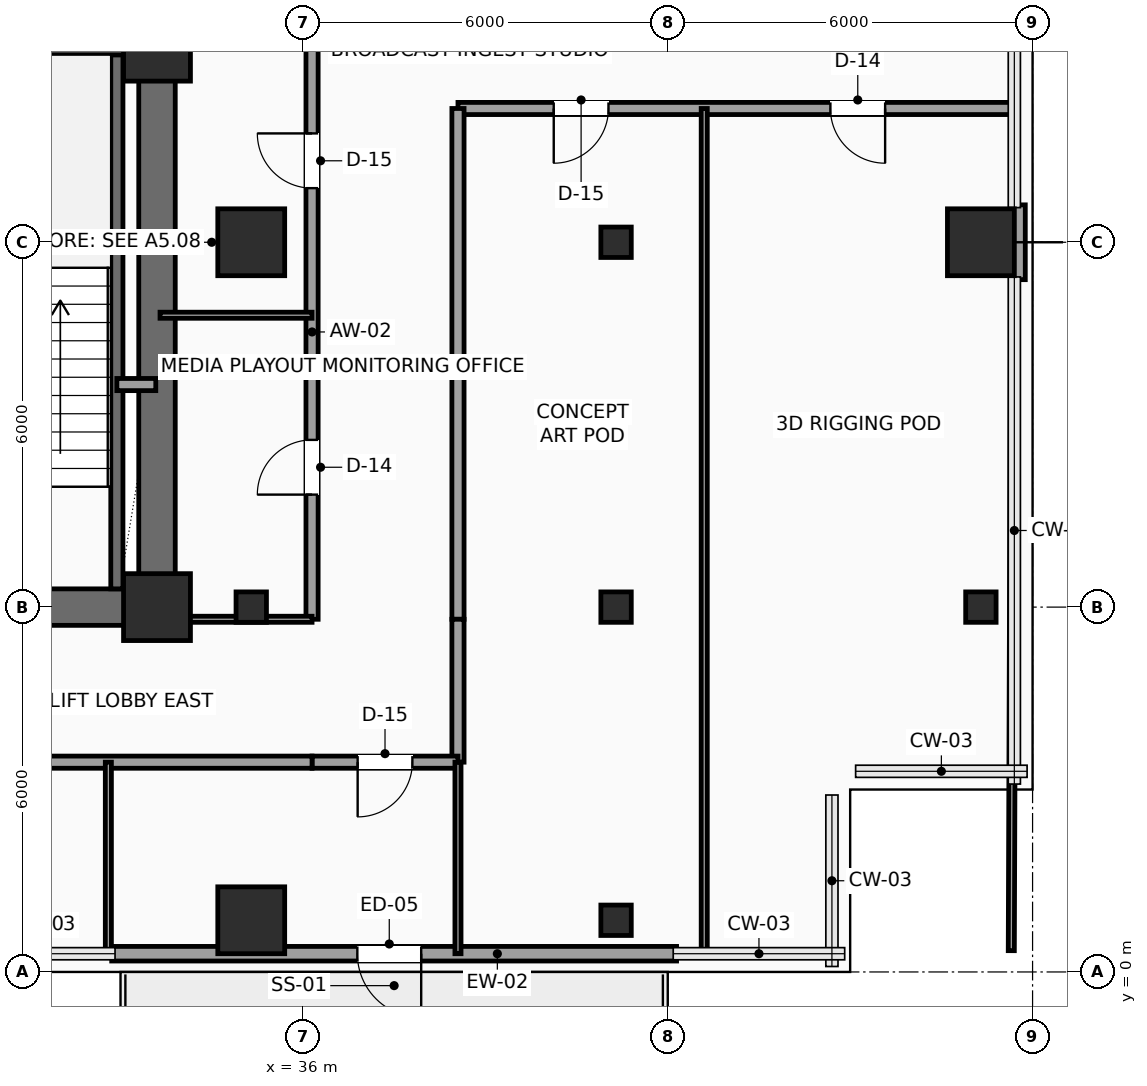
"""IFC4 building model, lengths in metres.
Left out: names, types, materials, properties, quantities, classifications, styles, units other than length and angle.
Written with IfcOpenShell. Run it as: python <this file> out.ifc"""

import sys

from ifc_helpers import new_model, si_unit, direction, frame, frame_2d, origin, origin_2d, place, context, subcontext, project, spatial, rectangle, hollow_rectangle, extrude, element, fill, save


model = new_model("IFC4")
c1 = context("Model", 3, precision=1e-05, world=origin(), true_north=direction((0.0, 1.0)))
c2 = subcontext(c1, "Body", "Model", "MODEL_VIEW")
j1 = project(units=[si_unit("LENGTHUNIT", "METRE"), si_unit("PLANEANGLEUNIT", "RADIAN")], contexts=[c1])
p1 = place(None, origin())
s1 = spatial("IfcSite", under=j1, at=p1, CompositionType="ELEMENT")
p2 = place(p1, origin())
s2 = spatial("IfcBuilding", under=s1, at=p2, CompositionType="ELEMENT")
p3 = place(p2, frame((0.0, 0.0, 138.15)))
s3 = spatial("IfcBuildingStorey", under=s2, at=p3, CompositionType="ELEMENT", Elevation=138.15)
for number, where, z_axis, x_axis in (
    (1, (33.6, 6.0, 0.0), (0.0, 0.0, 1.0), (1.0, 0.0, 0.0)),
    (2, (33.6, 15.2, 0.0), (0.0, 0.0, 1.0), (1.0, 0.0, 0.0)),
    (3, (35.15, 0.85, 0.0), (0.0, 0.0, 1.0), (1.0, 0.0, 0.0)),
):
    element("IfcColumn", number, at=place(p3, frame(where, z_axis=z_axis, x_axis=x_axis)), inside=s3, PredefinedType="COLUMN", context=c2, shape_type="SweptSolid", body=[
        extrude(rectangle(XDim=1.1, YDim=1.1, at=origin_2d()), origin(), (0.0, 0.0, 1.0), 3.75),
    ])
p4 = place(p3, frame((35.15, 6.0, 0.0), z_axis=(0.0, 0.0, 1.0), x_axis=(1.0, 0.0, 0.0)))
e4 = element("IfcColumn", 4, at=p4, inside=s3, PredefinedType="COLUMN", context=c2, shape_type="SweptSolid", body=[
    extrude(hollow_rectangle(XDim=0.5, YDim=0.5, WallThickness=0.025, InnerFilletRadius=0.025, OuterFilletRadius=0.04, at=origin_2d()), origin(), (0.0, 0.0, 1.0), 3.75),
])
p5 = place(p3, frame((35.15, 12.0, 0.0), z_axis=(0.0, 0.0, 1.0), x_axis=(1.0, 0.0, 0.0)))
e5 = element("IfcColumn", 5, at=p5, inside=s3, PredefinedType="COLUMN", context=c2, shape_type="SweptSolid", body=[
    extrude(rectangle(XDim=1.1, YDim=1.1, at=origin_2d()), origin(), (0.0, 0.0, 1.0), 3.75),
])
for number, where, z_axis, x_axis in (
    (6, (41.15, 0.85, 0.0), (0.0, 0.0, 1.0), (1.0, 0.0, 0.0)),
    (7, (41.15, 6.0, 0.0), (0.0, 0.0, 1.0), (1.0, 0.0, 0.0)),
    (8, (41.15, 12.0, 0.0), (0.0, 0.0, 1.0), (1.0, 0.0, 0.0)),
    (9, (47.15, 6.0, 0.0), (0.0, 0.0, 1.0), (1.0, 0.0, 0.0)),
):
    element("IfcColumn", number, at=place(p3, frame(where, z_axis=z_axis, x_axis=x_axis)), inside=s3, PredefinedType="COLUMN", context=c2, shape_type="SweptSolid", body=[
        extrude(hollow_rectangle(XDim=0.5, YDim=0.5, WallThickness=0.025, InnerFilletRadius=0.025, OuterFilletRadius=0.04, at=origin_2d()), origin(), (0.0, 0.0, 1.0), 3.75),
    ])
p6 = place(p3, frame((47.15, 12.0, 0.0), z_axis=(0.0, 0.0, 1.0), x_axis=(1.0, 0.0, 0.0)))
e10 = element("IfcColumn", 10, at=p6, inside=s3, PredefinedType="COLUMN", context=c2, shape_type="SweptSolid", body=[
    extrude(rectangle(XDim=1.1, YDim=1.1, at=origin_2d()), origin(), (0.0, 0.0, 1.0), 3.75),
])
p7 = place(p3, frame((42.145, 0.3, 0.0), z_axis=(0.0, 0.0, 1.0), x_axis=(-1.0, 0.0, 0.0)))
e11 = element("IfcWall", 11, at=p7, inside=s3, PredefinedType="SOLIDWALL", context=c2, shape_type="SweptSolid", body=[
    extrude(rectangle(XDim=9.29, YDim=0.24, at=frame_2d((4.645, 0.0))), origin(), (0.0, 0.0, 1.0), 3.525),
])
p8 = place(p7, frame((4.2, 0.0, 0.0)))
e12 = element("IfcOpeningElement", 12, at=p8, cuts=e11, PredefinedType="OPENING", context=c2, shape_type="SweptSolid", body=[
    extrude(rectangle(XDim=1.05, YDim=2.2, at=frame_2d((0.525, 1.1))), frame((0.0, 0.13, 0.0), z_axis=(0.0, -1.0, 0.0), x_axis=(1.0, 0.0, 0.0)), (0.0, 0.0, 1.0), 0.26),
])
p9 = place(p3, frame((47.76, 12.615, 0.0), z_axis=(0.0, 0.0, 1.0), x_axis=(0.0, -1.0, 0.0)))
e13 = element("IfcWall", 13, at=p9, inside=s3, PredefinedType="SOLIDWALL", context=c2, shape_type="SweptSolid", body=[
    extrude(rectangle(XDim=1.23, YDim=0.24, at=frame_2d((0.615, 0.0))), origin(), (0.0, 0.0, 1.0), 3.525),
])
p10 = place(p3, frame((24.0, 6.0, 0.0), z_axis=(0.0, 0.0, 1.0), x_axis=(1.0, 0.0, 0.0)))
e14 = element("IfcWall", 14, at=p10, inside=s3, PredefinedType="SHEAR", context=c2, shape_type="SweptSolid", body=[
    extrude(rectangle(XDim=9.6, YDim=0.6, at=frame_2d((4.8, 0.0))), origin(), (0.0, 0.0, 1.0), 3.525),
])
p11 = place(p3, frame((33.6, 6.0, 0.0), z_axis=(0.0, 0.0, 1.0), x_axis=(0.0, 1.0, 0.0)))
e15 = element("IfcWall", 15, at=p11, inside=s3, PredefinedType="SHEAR", context=c2, shape_type="SweptSolid", body=[
    extrude(rectangle(XDim=12.0, YDim=0.6, at=frame_2d((6.0, 0.0))), origin(), (0.0, 0.0, 1.0), 3.525),
])
p12 = place(p11, frame((10.15, 0.0, 0.0)))
e16 = element("IfcOpeningElement", 16, at=p12, cuts=e15, PredefinedType="OPENING", context=c2, shape_type="SweptSolid", body=[
    extrude(rectangle(XDim=0.9, YDim=2.15, at=frame_2d((0.45, 1.075))), frame((0.0, 0.31, 0.0), z_axis=(0.0, -1.0, 0.0), x_axis=(1.0, 0.0, 0.0)), (0.0, 0.0, 1.0), 0.62),
])
p13 = place(p3, frame((32.94, 6.3, 0.0), z_axis=(0.0, 0.0, 1.0), x_axis=(0.0, 1.0, 0.0)))
e17 = element("IfcWall", 17, at=p13, inside=s3, PredefinedType="SHEAR", context=c2, shape_type="SweptSolid", body=[
    extrude(rectangle(XDim=8.88, YDim=0.2, at=frame_2d((4.44, 0.0))), origin(), (0.0, 0.0, 1.0), 3.525),
])
p14 = place(p3, frame((29.26, 15.18, 0.0), z_axis=(0.0, 0.0, 1.0), x_axis=(1.0, 0.0, 0.0)))
e18 = element("IfcWall", 18, at=p14, inside=s3, PredefinedType="SHEAR", context=c2, shape_type="SweptSolid", body=[
    extrude(rectangle(XDim=4.04, YDim=0.2, at=frame_2d((2.02, 0.0))), origin(), (0.0, 0.0, 1.0), 3.525),
])
p15 = place(p3, frame((32.94, 9.66, 0.0), z_axis=(0.0, 0.0, 1.0), x_axis=(1.0, 0.0, 0.0)))
e19 = element("IfcWall", 19, at=p15, inside=s3, PredefinedType="SOLIDWALL", context=c2, shape_type="SweptSolid", body=[
    extrude(rectangle(XDim=0.64, YDim=0.2, at=frame_2d((0.32, 0.0))), origin(), (0.0, 0.0, 1.0), 3.525),
])
p16 = place(p3, frame((36.15, 5.8, 0.0), z_axis=(0.0, 0.0, 1.0), x_axis=(0.0, 1.0, 0.0)))
e20 = element("IfcWall", 20, at=p16, inside=s3, PredefinedType="PARTITIONING", context=c2, shape_type="SweptSolid", body=[
    extrude(rectangle(XDim=10.08, YDim=0.2, at=frame_2d((5.04, 0.0))), origin(), (0.0, 0.0, 1.0), 3.525),
])
p17 = place(p16, frame((2.05, 0.0, 0.0)))
e21 = element("IfcOpeningElement", 21, at=p17, cuts=e20, PredefinedType="OPENING", context=c2, shape_type="SweptSolid", body=[
    extrude(rectangle(XDim=0.9, YDim=2.1, at=frame_2d((0.45, 1.05))), frame((0.0, 0.11, 0.0), z_axis=(0.0, -1.0, 0.0), x_axis=(1.0, 0.0, 0.0)), (0.0, 0.0, 1.0), 0.22),
])
p18 = place(p16, frame((7.09, 0.0, 0.0)))
e22 = element("IfcOpeningElement", 22, at=p18, cuts=e20, PredefinedType="OPENING", context=c2, shape_type="SweptSolid", body=[
    extrude(rectangle(XDim=0.9, YDim=2.1, at=frame_2d((0.45, 1.05))), frame((0.0, 0.11, 0.0), z_axis=(0.0, -1.0, 0.0), x_axis=(1.0, 0.0, 0.0)), (0.0, 0.0, 1.0), 0.22),
])
p19 = place(p3, frame((47.7, 14.2, 0.0), z_axis=(0.0, 0.0, 1.0), x_axis=(-1.0, 0.0, 0.0)))
e23 = element("IfcWall", 23, at=p19, inside=s3, PredefinedType="PARTITIONING", context=c2, shape_type="SweptSolid", body=[
    extrude(rectangle(XDim=9.15, YDim=0.2, at=frame_2d((4.575, 0.0))), origin(), (0.0, 0.0, 1.0), 3.525),
])
p20 = place(p19, frame((6.675, 0.0, 0.0)))
e24 = element("IfcOpeningElement", 24, at=p20, cuts=e23, PredefinedType="OPENING", context=c2, shape_type="SweptSolid", body=[
    extrude(rectangle(XDim=0.9, YDim=2.1, at=frame_2d((0.45, 1.05))), frame((0.0, 0.11, 0.0), z_axis=(0.0, -1.0, 0.0), x_axis=(1.0, 0.0, 0.0)), (0.0, 0.0, 1.0), 0.22),
])
p21 = place(p19, frame((2.125, 0.0, 0.0)))
e25 = element("IfcOpeningElement", 25, at=p21, cuts=e23, PredefinedType="OPENING", context=c2, shape_type="SweptSolid", body=[
    extrude(rectangle(XDim=0.9, YDim=2.1, at=frame_2d((0.45, 1.05))), frame((0.0, 0.11, 0.0), z_axis=(0.0, -1.0, 0.0), x_axis=(1.0, 0.0, 0.0)), (0.0, 0.0, 1.0), 0.22),
])
p22 = place(p3, frame((38.55, 14.2, 0.0), z_axis=(0.0, 0.0, 1.0), x_axis=(0.0, -1.0, 0.0)))
e26 = element("IfcWall", 26, at=p22, inside=s3, PredefinedType="PARTITIONING", context=c2, shape_type="SweptSolid", body=[
    extrude(rectangle(XDim=8.4, YDim=0.2, at=frame_2d((4.2, 0.0))), origin(), (0.0, 0.0, 1.0), 3.525),
])
p23 = place(p3, frame((38.55, 5.8, 0.0), z_axis=(0.0, 0.0, 1.0), x_axis=(0.0, -1.0, 0.0)))
e27 = element("IfcWall", 27, at=p23, inside=s3, PredefinedType="PARTITIONING", context=c2, shape_type="SweptSolid", body=[
    extrude(rectangle(XDim=2.35, YDim=0.2, at=frame_2d((1.175, 0.0))), origin(), (0.0, 0.0, 1.0), 3.525),
])
p24 = place(p3, frame((38.55, 3.45, 0.0), z_axis=(0.0, 0.0, 1.0), x_axis=(-1.0, 0.0, 0.0)))
e28 = element("IfcWall", 28, at=p24, inside=s3, PredefinedType="PARTITIONING", context=c2, shape_type="SweptSolid", body=[
    extrude(rectangle(XDim=2.4, YDim=0.2, at=frame_2d((1.2, 0.0))), origin(), (0.0, 0.0, 1.0), 3.067),
])
p25 = place(p24, frame((0.75, 0.0, 0.0)))
e29 = element("IfcOpeningElement", 29, at=p25, cuts=e28, PredefinedType="OPENING", context=c2, shape_type="SweptSolid", body=[
    extrude(rectangle(XDim=0.9, YDim=2.1, at=frame_2d((0.45, 1.05))), frame((0.0, 0.11, 0.0), z_axis=(0.0, -1.0, 0.0), x_axis=(1.0, 0.0, 0.0)), (0.0, 0.0, 1.0), 0.22),
])
p26 = place(p3, frame((36.15, 3.45, 0.0), z_axis=(0.0, 0.0, 1.0), x_axis=(-1.0, 0.0, 0.0)))
e30 = element("IfcWall", 30, at=p26, inside=s3, PredefinedType="PARTITIONING", context=c2, shape_type="SweptSolid", body=[
    extrude(rectangle(XDim=12.2, YDim=0.2, at=frame_2d((6.1, 0.0))), origin(), (0.0, 0.0, 1.0), 3.067),
])
p27 = place(p26, frame((10.175, 0.0, 0.0)))
e31 = element("IfcOpeningElement", 31, at=p27, cuts=e30, PredefinedType="OPENING", context=c2, shape_type="SweptSolid", body=[
    extrude(rectangle(XDim=0.9, YDim=2.1, at=frame_2d((0.45, 1.05))), frame((0.0, 0.11, 0.0), z_axis=(0.0, -1.0, 0.0), x_axis=(1.0, 0.0, 0.0)), (0.0, 0.0, 1.0), 0.22),
])
p28 = place(p26, frame((5.75, 0.0, 0.0)))
e32 = element("IfcOpeningElement", 32, at=p28, cuts=e30, PredefinedType="OPENING", context=c2, shape_type="SweptSolid", body=[
    extrude(rectangle(XDim=0.9, YDim=2.1, at=frame_2d((0.45, 1.05))), frame((0.0, 0.11, 0.0), z_axis=(0.0, -1.0, 0.0), x_axis=(1.0, 0.0, 0.0)), (0.0, 0.0, 1.0), 0.22),
])
for number, where, z_axis, x_axis in (
    (33, (32.8, 0.3, 0.0), (0.0, 0.0, 1.0), (0.0, 1.0, 0.0)),
    (34, (38.55, 0.3, 0.0), (0.0, 0.0, 1.0), (0.0, 1.0, 0.0)),
):
    element("IfcWall", number, at=place(p3, frame(where, z_axis=z_axis, x_axis=x_axis)), inside=s3, PredefinedType="PARTITIONING", context=c2, shape_type="SweptSolid", body=[
        extrude(rectangle(XDim=3.15, YDim=0.1, at=frame_2d((1.575, 0.0))), origin(), (0.0, 0.0, 1.0), 3.525),
    ])
p29 = place(p3, frame((33.65, 5.8, 0.0), z_axis=(0.0, 0.0, 1.0), x_axis=(1.0, 0.0, 0.0)))
e35 = element("IfcWall", 35, at=p29, inside=s3, PredefinedType="PARTITIONING", context=c2, shape_type="SweptSolid", body=[
    extrude(rectangle(XDim=2.5, YDim=0.1, at=frame_2d((1.25, 0.0))), origin(), (0.0, 0.0, 1.0), 3.017),
])
p30 = place(p3, frame((33.65, 10.8, 0.0), z_axis=(0.0, 0.0, 1.0), x_axis=(1.0, 0.0, 0.0)))
e36 = element("IfcWall", 36, at=p30, inside=s3, PredefinedType="PARTITIONING", context=c2, shape_type="SweptSolid", body=[
    extrude(rectangle(XDim=2.5, YDim=0.1, at=frame_2d((1.25, 0.0))), origin(), (0.0, 0.0, 1.0), 3.525),
])
p31 = place(p3, frame((42.6, 0.3, 0.0), z_axis=(0.0, 0.0, 1.0), x_axis=(0.0, 1.0, 0.0)))
e37 = element("IfcWall", 37, at=p31, inside=s3, PredefinedType="PARTITIONING", context=c2, shape_type="SweptSolid", body=[
    extrude(rectangle(XDim=13.9, YDim=0.1, at=frame_2d((6.95, 0.0))), origin(), (0.0, 0.0, 1.0), 3.525),
])
p32 = place(p3, frame((47.65, 0.35, 0.0), z_axis=(0.0, 0.0, 1.0), x_axis=(0.003606251025, 0.999993497456, 0.0)))
e38 = element("IfcWall", 38, at=p32, inside=s3, PredefinedType="PARTITIONING", context=c2, shape_type="SweptSolid", body=[
    extrude(rectangle(XDim=11.035, YDim=0.1, at=frame_2d((5.518, 0.0))), origin(), (0.0, 0.0, 1.0), 3.525),
])
p33 = place(p3, frame((47.694, 12.615, 0.0), z_axis=(0.0, 0.0, 1.0), x_axis=(0.003542799701, 0.999993724265, 0.0)))
e39 = element("IfcWall", 39, at=p33, inside=s3, PredefinedType="PARTITIONING", context=c2, shape_type="SweptSolid", body=[
    extrude(rectangle(XDim=1.585, YDim=0.1, at=frame_2d((0.792, 0.0))), origin(), (0.0, 0.0, 1.0), 3.525),
])
p34 = place(p8, origin())
e40 = element("IfcDoor", 40, at=p34, inside=s3, OperationType="SINGLE_SWING_LEFT", PredefinedType="DOOR", context=c2, shape_type="SweptSolid", body=[
    extrude(rectangle(XDim=1.05, YDim=2.2, at=frame_2d((0.525, 1.1))), frame((0.0, 0.025, 0.0), z_axis=(0.0, -1.0, 0.0), x_axis=(1.0, 0.0, 0.0)), (0.0, 0.0, 1.0), 0.05),
])
fill(e12, e40)
p35 = place(p17, origin())
e41 = element("IfcDoor", 41, at=p35, inside=s3, OperationType="SINGLE_SWING_LEFT", PredefinedType="DOOR", context=c2, shape_type="SweptSolid", body=[
    extrude(rectangle(XDim=0.9, YDim=2.1, at=frame_2d((0.45, 1.05))), frame((0.0, 0.025, 0.0), z_axis=(0.0, -1.0, 0.0), x_axis=(1.0, 0.0, 0.0)), (0.0, 0.0, 1.0), 0.05),
])
fill(e21, e41)
p36 = place(p18, origin())
e42 = element("IfcDoor", 42, at=p36, inside=s3, OperationType="SINGLE_SWING_RIGHT", PredefinedType="DOOR", context=c2, shape_type="SweptSolid", body=[
    extrude(rectangle(XDim=0.9, YDim=2.1, at=frame_2d((0.45, 1.05))), frame((0.0, 0.025, 0.0), z_axis=(0.0, -1.0, 0.0), x_axis=(1.0, 0.0, 0.0)), (0.0, 0.0, 1.0), 0.05),
])
fill(e22, e42)
p37 = place(p20, origin())
e43 = element("IfcDoor", 43, at=p37, inside=s3, OperationType="SINGLE_SWING_RIGHT", PredefinedType="DOOR", context=c2, shape_type="SweptSolid", body=[
    extrude(rectangle(XDim=0.9, YDim=2.1, at=frame_2d((0.45, 1.05))), frame((0.0, 0.025, 0.0), z_axis=(0.0, -1.0, 0.0), x_axis=(1.0, 0.0, 0.0)), (0.0, 0.0, 1.0), 0.05),
])
fill(e24, e43)
p38 = place(p21, origin())
e44 = element("IfcDoor", 44, at=p38, inside=s3, OperationType="SINGLE_SWING_LEFT", PredefinedType="DOOR", context=c2, shape_type="SweptSolid", body=[
    extrude(rectangle(XDim=0.9, YDim=2.1, at=frame_2d((0.45, 1.05))), frame((0.0, 0.025, 0.0), z_axis=(0.0, -1.0, 0.0), x_axis=(1.0, 0.0, 0.0)), (0.0, 0.0, 1.0), 0.05),
])
fill(e25, e44)
p39 = place(p25, origin())
e45 = element("IfcDoor", 45, at=p39, inside=s3, OperationType="SINGLE_SWING_RIGHT", PredefinedType="DOOR", context=c2, shape_type="SweptSolid", body=[
    extrude(rectangle(XDim=0.9, YDim=2.1, at=frame_2d((0.45, 1.05))), frame((0.0, 0.025, 0.0), z_axis=(0.0, -1.0, 0.0), x_axis=(1.0, 0.0, 0.0)), (0.0, 0.0, 1.0), 0.05),
])
fill(e29, e45)
save(model, sys.argv[1])
